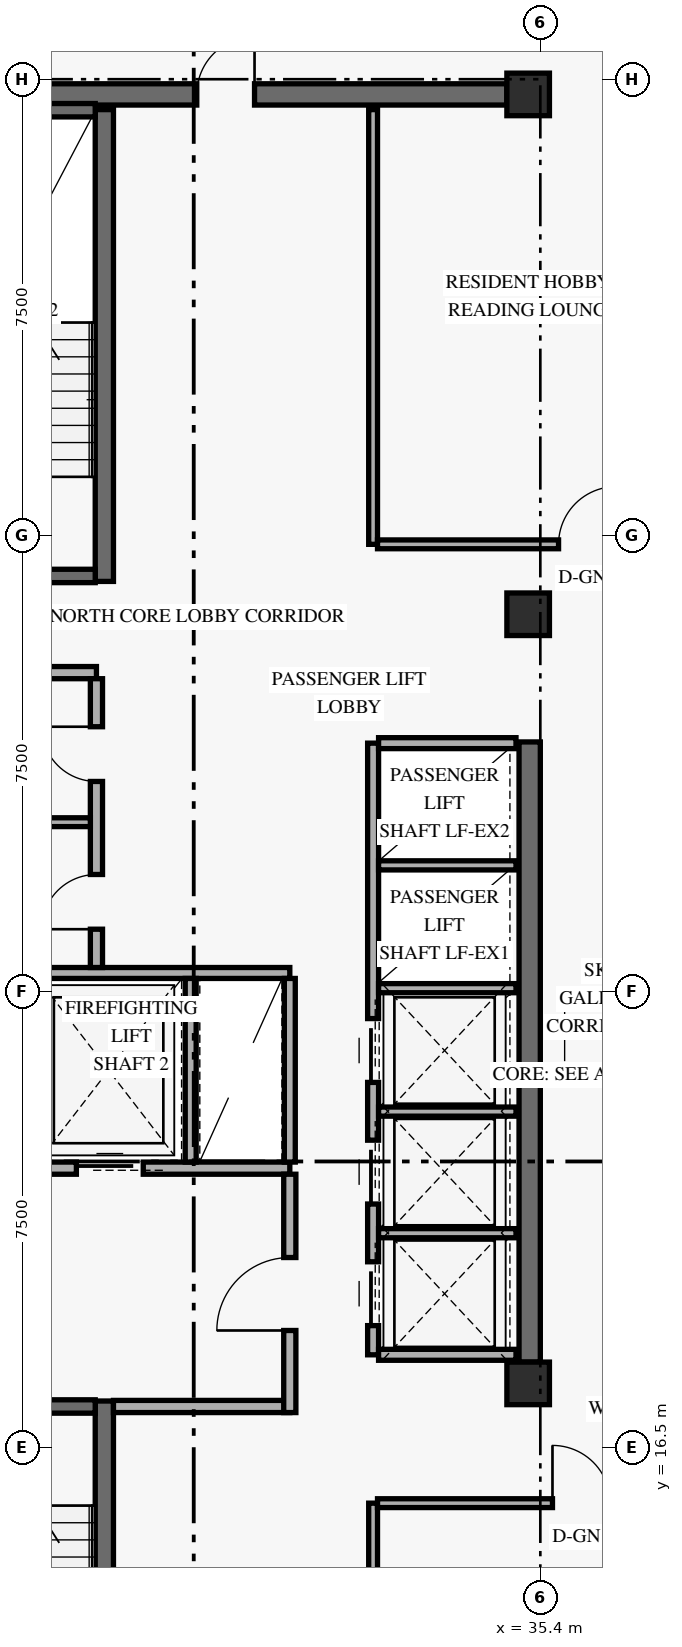
"""IFC4 building model, lengths in metres.
Left out: names, types, materials, properties, quantities, classifications, styles, units other than length and angle.
Written with IfcOpenShell. Run it as: python <this file> out.ifc"""

import sys

from ifc_helpers import new_model, si_unit, direction, frame, frame_2d, origin, origin_2d, place, context, subcontext, project, spatial, rectangle, extrude, element, fill, save


model = new_model("IFC4")
c1 = context("Model", 3, precision=1e-05, world=origin(), true_north=direction((0.0, 1.0)))
c2 = subcontext(c1, "Body", "Model", "MODEL_VIEW")
j1 = project(units=[si_unit("LENGTHUNIT", "METRE"), si_unit("PLANEANGLEUNIT", "RADIAN")], contexts=[c1])
p1 = place(None, origin())
s1 = spatial("IfcSite", under=j1, at=p1, CompositionType="ELEMENT")
p2 = place(p1, origin())
s2 = spatial("IfcBuilding", under=s1, at=p2, CompositionType="ELEMENT")
p3 = place(p2, frame((0.0, 0.0, 209.4)))
s3 = spatial("IfcBuildingStorey", under=s2, at=p3, CompositionType="ELEMENT", Elevation=209.4)
p4 = place(p3, frame((35.225, 17.9, 0.0), z_axis=(0.0, 0.0, 1.0), x_axis=(0.0, 1.0, 0.0)))
e1 = element("IfcWall", 1, at=p4, inside=s3, PredefinedType="SHEAR", context=c2, shape_type="SweptSolid", body=[
    extrude(rectangle(XDim=10.2, YDim=0.35, at=frame_2d((5.1, 0.0))), origin(), (0.0, 0.0, 1.0), 2.821),
])
p5 = place(p3, frame((24.55, 38.75, 0.0), z_axis=(0.0, 0.0, 1.0), x_axis=(1.0, 0.0, 0.0)))
e2 = element("IfcWall", 2, at=p5, inside=s3, PredefinedType="SHEAR", context=c2, shape_type="SweptSolid", body=[
    extrude(rectangle(XDim=10.3, YDim=0.35, at=frame_2d((5.15, 0.0))), origin(), (0.0, 0.0, 1.0), 3.36),
])
p6 = place(p5, frame((5.2, 0.0, 0.0)))
e3 = element("IfcOpeningElement", 3, at=p6, cuts=e2, PredefinedType="OPENING", context=c2, shape_type="SweptSolid", body=[
    extrude(rectangle(XDim=0.95, YDim=2.15, at=frame_2d((0.475, 1.075))), frame((0.0, 0.185, 0.0), z_axis=(0.0, -1.0, 0.0), x_axis=(1.0, 0.0, 0.0)), (0.0, 0.0, 1.0), 0.37),
])
p7 = place(p3, frame((28.23, 9.5, 0.0), z_axis=(0.0, 0.0, 1.0), x_axis=(0.0, 1.0, 0.0)))
e4 = element("IfcWall", 4, at=p7, inside=s3, PredefinedType="SHEAR", context=c2, shape_type="SweptSolid", body=[
    extrude(rectangle(XDim=7.76, YDim=0.3, at=frame_2d((3.88, 0.0))), origin(), (0.0, 0.0, 1.0), 3.36),
])
p8 = place(p3, frame((24.92, 17.17, 0.0), z_axis=(0.0, 0.0, 1.0), x_axis=(1.0, 0.0, 0.0)))
e5 = element("IfcWall", 5, at=p8, inside=s3, PredefinedType="SHEAR", context=c2, shape_type="SweptSolid", body=[
    extrude(rectangle(XDim=3.16, YDim=0.22, at=frame_2d((1.58, 0.0))), origin(), (0.0, 0.0, 1.0), 3.36),
])
p9 = place(p8, frame((0.78, 0.0, 0.0)))
e6 = element("IfcOpeningElement", 6, at=p9, cuts=e5, PredefinedType="OPENING", context=c2, shape_type="SweptSolid", body=[
    extrude(rectangle(XDim=1.05, YDim=2.15, at=frame_2d((0.525, 1.075))), frame((0.0, 0.12, 0.0), z_axis=(0.0, -1.0, 0.0), x_axis=(1.0, 0.0, 0.0)), (0.0, 0.0, 1.0), 0.24),
])
p10 = place(p3, frame((28.23, 30.74, 0.0), z_axis=(0.0, 0.0, 1.0), x_axis=(0.0, 1.0, 0.0)))
e7 = element("IfcWall", 7, at=p10, inside=s3, PredefinedType="SHEAR", context=c2, shape_type="SweptSolid", body=[
    extrude(rectangle(XDim=7.76, YDim=0.3, at=frame_2d((3.88, 0.0))), origin(), (0.0, 0.0, 1.0), 3.36),
])
p11 = place(p3, frame((24.92, 30.83, 0.0), z_axis=(0.0, 0.0, 1.0), x_axis=(1.0, 0.0, 0.0)))
e8 = element("IfcWall", 8, at=p11, inside=s3, PredefinedType="SHEAR", context=c2, shape_type="SweptSolid", body=[
    extrude(rectangle(XDim=3.16, YDim=0.22, at=frame_2d((1.58, 0.0))), origin(), (0.0, 0.0, 1.0), 3.36),
])
p12 = place(p11, frame((0.78, 0.0, 0.0)))
e9 = element("IfcOpeningElement", 9, at=p12, cuts=e8, PredefinedType="OPENING", context=c2, shape_type="SweptSolid", body=[
    extrude(rectangle(XDim=1.05, YDim=2.15, at=frame_2d((0.525, 1.075))), frame((0.0, 0.12, 0.0), z_axis=(0.0, -1.0, 0.0), x_axis=(1.0, 0.0, 0.0)), (0.0, 0.0, 1.0), 0.24),
])
p13 = place(p3, frame((24.92, 38.49, 0.0), z_axis=(0.0, 0.0, 1.0), x_axis=(1.0, 0.0, 0.0)))
e10 = element("IfcWall", 10, at=p13, inside=s3, PredefinedType="SHEAR", context=c2, shape_type="SweptSolid", body=[
    extrude(rectangle(XDim=3.16, YDim=0.22, at=frame_2d((1.58, 0.0))), origin(), (0.0, 0.0, 1.0), 3.36),
])
for number, where, z_axis, x_axis in (
    (11, (35.2, 17.55, 0.0), (0.0, 0.0, 1.0), (1.0, 0.0, 0.0)),
    (12, (35.2, 30.2, 0.0), (0.0, 0.0, 1.0), (1.0, 0.0, 0.0)),
    (13, (35.2, 38.75, 0.0), (0.0, 0.0, 1.0), (1.0, 0.0, 0.0)),
):
    element("IfcColumn", number, at=place(p3, frame(where, z_axis=z_axis, x_axis=x_axis)), inside=s3, PredefinedType="COLUMN", context=c2, shape_type="SweptSolid", body=[
        extrude(rectangle(XDim=0.7, YDim=0.7, at=origin_2d()), origin(), (0.0, 0.0, 1.0), 3.6),
    ])
p14 = place(p3, frame((24.45, 21.09, 0.0), z_axis=(0.0, 0.0, 1.0), x_axis=(1.0, 0.0, 0.0)))
e14 = element("IfcWall", 14, at=p14, inside=s3, PredefinedType="STANDARD", context=c2, shape_type="SweptSolid", body=[
    extrude(rectangle(XDim=6.83, YDim=0.2, at=frame_2d((3.415, 0.0))), origin(), (0.0, 0.0, 1.0), 3.36),
])
p15 = place(p14, frame((0.72, 0.0, 0.0)))
e15 = element("IfcOpeningElement", 15, at=p15, cuts=e14, PredefinedType="OPENING", context=c2, shape_type="SweptSolid", body=[
    extrude(rectangle(XDim=1.1, YDim=2.2, at=frame_2d((0.55, 1.1))), frame((0.0, 0.11, 0.0), z_axis=(0.0, -1.0, 0.0), x_axis=(1.0, 0.0, 0.0)), (0.0, 0.0, 1.0), 0.22),
])
p16 = place(p14, frame((3.32, 0.0, 0.0)))
e16 = element("IfcOpeningElement", 16, at=p16, cuts=e14, PredefinedType="OPENING", context=c2, shape_type="SweptSolid", body=[
    extrude(rectangle(XDim=1.1, YDim=2.2, at=frame_2d((0.55, 1.1))), frame((0.0, 0.11, 0.0), z_axis=(0.0, -1.0, 0.0), x_axis=(1.0, 0.0, 0.0)), (0.0, 0.0, 1.0), 0.22),
])
p17 = place(p3, frame((28.38, 17.17, 0.0), z_axis=(0.0, 0.0, 1.0), x_axis=(1.0, 0.0, 0.0)))
e17 = element("IfcWall", 17, at=p17, inside=s3, PredefinedType="STANDARD", context=c2, shape_type="SweptSolid", body=[
    extrude(rectangle(XDim=2.9, YDim=0.2, at=frame_2d((1.45, 0.0))), origin(), (0.0, 0.0, 1.0), 3.36),
])
p18 = place(p3, frame((31.28, 17.07, 0.0), z_axis=(0.0, 0.0, 1.0), x_axis=(0.0, 1.0, 0.0)))
e18 = element("IfcWall", 18, at=p18, inside=s3, PredefinedType="STANDARD", context=c2, shape_type="SweptSolid", body=[
    extrude(rectangle(XDim=3.92, YDim=0.2, at=frame_2d((1.96, 0.0))), origin(), (0.0, 0.0, 1.0), 2.803),
])
p19 = place(p18, frame((1.35, 0.0, 0.0)))
e19 = element("IfcOpeningElement", 19, at=p19, cuts=e18, PredefinedType="OPENING", context=c2, shape_type="SweptSolid", body=[
    extrude(rectangle(XDim=1.2, YDim=2.15, at=frame_2d((0.6, 1.075))), frame((0.0, 0.11, 0.0), z_axis=(0.0, -1.0, 0.0), x_axis=(1.0, 0.0, 0.0)), (0.0, 0.0, 1.0), 0.22),
])
p20 = place(p3, frame((24.45, 24.3, 0.0), z_axis=(0.0, 0.0, 1.0), x_axis=(1.0, 0.0, 0.0)))
e20 = element("IfcWall", 20, at=p20, inside=s3, PredefinedType="STANDARD", context=c2, shape_type="SweptSolid", body=[
    extrude(rectangle(XDim=6.83, YDim=0.18, at=frame_2d((3.415, 0.0))), origin(), (0.0, 0.0, 1.0), 3.36),
])
for number, where, z_axis, x_axis in (
    (21, (29.65, 21.19, 0.0), (0.0, 0.0, 1.0), (0.0, 1.0, 0.0)),
    (22, (31.28, 21.19, 0.0), (0.0, 0.0, 1.0), (0.0, 1.0, 0.0)),
):
    element("IfcWall", number, at=place(p3, frame(where, z_axis=z_axis, x_axis=x_axis)), inside=s3, PredefinedType="STANDARD", context=c2, shape_type="SweptSolid", body=[
        extrude(rectangle(XDim=3.02, YDim=0.18, at=frame_2d((1.51, 0.0))), origin(), (0.0, 0.0, 1.0), 3.36),
    ])
p21 = place(p3, frame((24.45, 29.24, 0.0), z_axis=(0.0, 0.0, 1.0), x_axis=(1.0, 0.0, 0.0)))
e23 = element("IfcWall", 23, at=p21, inside=s3, PredefinedType="STANDARD", context=c2, shape_type="SweptSolid", body=[
    extrude(rectangle(XDim=3.65, YDim=0.2, at=frame_2d((1.825, 0.0))), origin(), (0.0, 0.0, 1.0), 3.36),
])
p22 = place(p3, frame((28.1, 24.39, 0.0), z_axis=(0.0, 0.0, 1.0), x_axis=(0.0, 1.0, 0.0)))
e24 = element("IfcWall", 24, at=p22, inside=s3, PredefinedType="STANDARD", context=c2, shape_type="SweptSolid", body=[
    extrude(rectangle(XDim=4.75, YDim=0.2, at=frame_2d((2.375, 0.0))), origin(), (0.0, 0.0, 1.0), 3.36),
])
p23 = place(p22, frame((0.63, 0.0, 0.0)))
e25 = element("IfcOpeningElement", 25, at=p23, cuts=e24, PredefinedType="OPENING", context=c2, shape_type="SweptSolid", body=[
    extrude(rectangle(XDim=0.9, YDim=2.1, at=frame_2d((0.45, 1.05))), frame((0.0, 0.11, 0.0), z_axis=(0.0, -1.0, 0.0), x_axis=(1.0, 0.0, 0.0)), (0.0, 0.0, 1.0), 0.22),
])
p24 = place(p22, frame((3.06, 0.0, 0.0)))
e26 = element("IfcOpeningElement", 26, at=p24, cuts=e24, PredefinedType="OPENING", context=c2, shape_type="SweptSolid", body=[
    extrude(rectangle(XDim=0.9, YDim=2.1, at=frame_2d((0.45, 1.05))), frame((0.0, 0.11, 0.0), z_axis=(0.0, -1.0, 0.0), x_axis=(1.0, 0.0, 0.0)), (0.0, 0.0, 1.0), 0.22),
])
p25 = place(p3, frame((24.45, 26.78, 0.0), z_axis=(0.0, 0.0, 1.0), x_axis=(1.0, 0.0, 0.0)))
e27 = element("IfcWall", 27, at=p25, inside=s3, PredefinedType="PARTITIONING", context=c2, shape_type="SweptSolid", body=[
    extrude(rectangle(XDim=3.55, YDim=0.145, at=frame_2d((1.775, 0.0))), origin(), (0.0, 0.0, 1.0), 3.36),
])
p26 = place(p3, frame((32.65, 18.02, 0.0), z_axis=(0.0, 0.0, 1.0), x_axis=(0.0, 1.0, 0.0)))
e28 = element("IfcWall", 28, at=p26, inside=s3, PredefinedType="STANDARD", context=c2, shape_type="SweptSolid", body=[
    extrude(rectangle(XDim=10.06, YDim=0.18, at=frame_2d((5.03, 0.0))), origin(), (0.0, 0.0, 1.0), 3.36),
])
p27 = place(p26, frame((0.48, 0.0, 0.0)))
e29 = element("IfcOpeningElement", 29, at=p27, cuts=e28, PredefinedType="OPENING", context=c2, shape_type="SweptSolid", body=[
    extrude(rectangle(XDim=1.05, YDim=2.2, at=frame_2d((0.525, 1.1))), frame((0.0, 0.1, 0.0), z_axis=(0.0, -1.0, 0.0), x_axis=(1.0, 0.0, 0.0)), (0.0, 0.0, 1.0), 0.2),
])
p28 = place(p26, frame((2.48, 0.0, 0.0)))
e30 = element("IfcOpeningElement", 30, at=p28, cuts=e28, PredefinedType="OPENING", context=c2, shape_type="SweptSolid", body=[
    extrude(rectangle(XDim=1.05, YDim=2.2, at=frame_2d((0.525, 1.1))), frame((0.0, 0.1, 0.0), z_axis=(0.0, -1.0, 0.0), x_axis=(1.0, 0.0, 0.0)), (0.0, 0.0, 1.0), 0.2),
])
p29 = place(p26, frame((4.48, 0.0, 0.0)))
e31 = element("IfcOpeningElement", 31, at=p29, cuts=e28, PredefinedType="OPENING", context=c2, shape_type="SweptSolid", body=[
    extrude(rectangle(XDim=1.05, YDim=2.2, at=frame_2d((0.525, 1.1))), frame((0.0, 0.1, 0.0), z_axis=(0.0, -1.0, 0.0), x_axis=(1.0, 0.0, 0.0)), (0.0, 0.0, 1.0), 0.2),
])
for number, where, z_axis, x_axis in (
    (32, (32.74, 18.02, 0.0), (0.0, 0.0, 1.0), (1.0, 0.0, 0.0)),
    (33, (32.74, 28.08, 0.0), (0.0, 0.0, 1.0), (1.0, 0.0, 0.0)),
):
    element("IfcWall", number, at=place(p3, frame(where, z_axis=z_axis, x_axis=x_axis)), inside=s3, PredefinedType="STANDARD", context=c2, shape_type="SweptSolid", body=[
        extrude(rectangle(XDim=2.26, YDim=0.18, at=frame_2d((1.13, 0.0))), origin(), (0.0, 0.0, 1.0), 3.36),
    ])
for number, where, z_axis, x_axis in (
    (34, (32.74, 20.02, 0.0), (0.0, 0.0, 1.0), (1.0, 0.0, 0.0)),
    (35, (32.74, 22.02, 0.0), (0.0, 0.0, 1.0), (1.0, 0.0, 0.0)),
    (36, (32.74, 24.05, 0.0), (0.0, 0.0, 1.0), (1.0, 0.0, 0.0)),
    (37, (32.74, 26.07, 0.0), (0.0, 0.0, 1.0), (1.0, 0.0, 0.0)),
):
    element("IfcWall", number, at=place(p3, frame(where, z_axis=z_axis, x_axis=x_axis)), inside=s3, PredefinedType="STANDARD", context=c2, shape_type="SweptSolid", body=[
        extrude(rectangle(XDim=2.26, YDim=0.15, at=frame_2d((1.13, 0.0))), origin(), (0.0, 0.0, 1.0), 3.36),
    ])
p30 = place(p3, frame((32.65, 9.5, 0.0), z_axis=(0.0, 0.0, 1.0), x_axis=(0.0, 1.0, 0.0)))
e38 = element("IfcWall", 38, at=p30, inside=s3, PredefinedType="PARTITIONING", context=c2, shape_type="SweptSolid", body=[
    extrude(rectangle(XDim=6.08, YDim=0.145, at=frame_2d((3.04, 0.0))), origin(), (0.0, 0.0, 1.0), 3.36),
])
p31 = place(p3, frame((32.722, 15.58, 0.0), z_axis=(0.0, 0.0, 1.0), x_axis=(1.0, 0.0, 0.0)))
e39 = element("IfcWall", 39, at=p31, inside=s3, PredefinedType="PARTITIONING", context=c2, shape_type="SweptSolid", body=[
    extrude(rectangle(XDim=5.228, YDim=0.145, at=frame_2d((2.614, 0.0))), origin(), (0.0, 0.0, 1.0), 2.803),
])
p32 = place(p31, frame((2.877, 0.0, 0.0)))
e40 = element("IfcOpeningElement", 40, at=p32, cuts=e39, PredefinedType="OPENING", context=c2, shape_type="SweptSolid", body=[
    extrude(rectangle(XDim=0.95, YDim=2.15, at=frame_2d((0.475, 1.075))), frame((0.0, 0.083, 0.0), z_axis=(0.0, -1.0, 0.0), x_axis=(1.0, 0.0, 0.0)), (0.0, 0.0, 1.0), 0.165),
])
p33 = place(p3, frame((32.65, 31.35, 0.0), z_axis=(0.0, 0.0, 1.0), x_axis=(0.0, 1.0, 0.0)))
e41 = element("IfcWall", 41, at=p33, inside=s3, PredefinedType="PARTITIONING", context=c2, shape_type="SweptSolid", body=[
    extrude(rectangle(XDim=7.15, YDim=0.145, at=frame_2d((3.575, 0.0))), origin(), (0.0, 0.0, 1.0), 3.36),
])
p34 = place(p3, frame((32.722, 31.35, 0.0), z_axis=(0.0, 0.0, 1.0), x_axis=(1.0, 0.0, 0.0)))
e42 = element("IfcWall", 42, at=p34, inside=s3, PredefinedType="PARTITIONING", context=c2, shape_type="SweptSolid", body=[
    extrude(rectangle(XDim=5.778, YDim=0.145, at=frame_2d((2.889, 0.0))), origin(), (0.0, 0.0, 1.0), 2.803),
])
p35 = place(p34, frame((2.978, 0.0, 0.0)))
e43 = element("IfcOpeningElement", 43, at=p35, cuts=e42, PredefinedType="OPENING", context=c2, shape_type="SweptSolid", body=[
    extrude(rectangle(XDim=0.95, YDim=2.15, at=frame_2d((0.475, 1.075))), frame((0.0, 0.083, 0.0), z_axis=(0.0, -1.0, 0.0), x_axis=(1.0, 0.0, 0.0)), (0.0, 0.0, 1.0), 0.165),
])
p36 = place(p16, origin())
e44 = element("IfcDoor", 44, at=p36, inside=s3, OperationType="SLIDING_TO_LEFT", PredefinedType="DOOR", context=c2, shape_type="SweptSolid", body=[
    extrude(rectangle(XDim=1.1, YDim=2.2, at=frame_2d((0.55, 1.1))), frame((0.0, 0.025, 0.0), z_axis=(0.0, -1.0, 0.0), x_axis=(1.0, 0.0, 0.0)), (0.0, 0.0, 1.0), 0.05),
])
fill(e16, e44)
p37 = place(p19, origin())
e45 = element("IfcDoor", 45, at=p37, inside=s3, OperationType="SINGLE_SWING_LEFT", PredefinedType="DOOR", context=c2, shape_type="SweptSolid", body=[
    extrude(rectangle(XDim=1.2, YDim=2.15, at=frame_2d((0.6, 1.075))), frame((0.0, 0.025, 0.0), z_axis=(0.0, -1.0, 0.0), x_axis=(1.0, 0.0, 0.0)), (0.0, 0.0, 1.0), 0.05),
])
fill(e19, e45)
p38 = place(p23, origin())
e46 = element("IfcDoor", 46, at=p38, inside=s3, OperationType="SINGLE_SWING_LEFT", PredefinedType="DOOR", context=c2, shape_type="SweptSolid", body=[
    extrude(rectangle(XDim=0.9, YDim=2.1, at=frame_2d((0.45, 1.05))), frame((0.0, 0.025, 0.0), z_axis=(0.0, -1.0, 0.0), x_axis=(1.0, 0.0, 0.0)), (0.0, 0.0, 1.0), 0.05),
])
fill(e25, e46)
p39 = place(p24, origin())
e47 = element("IfcDoor", 47, at=p39, inside=s3, OperationType="SINGLE_SWING_RIGHT", PredefinedType="DOOR", context=c2, shape_type="SweptSolid", body=[
    extrude(rectangle(XDim=0.9, YDim=2.1, at=frame_2d((0.45, 1.05))), frame((0.0, 0.025, 0.0), z_axis=(0.0, -1.0, 0.0), x_axis=(1.0, 0.0, 0.0)), (0.0, 0.0, 1.0), 0.05),
])
fill(e26, e47)
p40 = place(p27, origin())
e48 = element("IfcDoor", 48, at=p40, inside=s3, OperationType="SLIDING_TO_LEFT", PredefinedType="DOOR", context=c2, shape_type="SweptSolid", body=[
    extrude(rectangle(XDim=1.05, YDim=2.2, at=frame_2d((0.525, 1.1))), frame((0.0, 0.025, 0.0), z_axis=(0.0, -1.0, 0.0), x_axis=(1.0, 0.0, 0.0)), (0.0, 0.0, 1.0), 0.05),
])
fill(e29, e48)
p41 = place(p28, origin())
e49 = element("IfcDoor", 49, at=p41, inside=s3, OperationType="SLIDING_TO_LEFT", PredefinedType="DOOR", context=c2, shape_type="SweptSolid", body=[
    extrude(rectangle(XDim=1.05, YDim=2.2, at=frame_2d((0.525, 1.1))), frame((0.0, 0.025, 0.0), z_axis=(0.0, -1.0, 0.0), x_axis=(1.0, 0.0, 0.0)), (0.0, 0.0, 1.0), 0.05),
])
fill(e30, e49)
p42 = place(p29, origin())
e50 = element("IfcDoor", 50, at=p42, inside=s3, OperationType="SLIDING_TO_LEFT", PredefinedType="DOOR", context=c2, shape_type="SweptSolid", body=[
    extrude(rectangle(XDim=1.05, YDim=2.2, at=frame_2d((0.525, 1.1))), frame((0.0, 0.025, 0.0), z_axis=(0.0, -1.0, 0.0), x_axis=(1.0, 0.0, 0.0)), (0.0, 0.0, 1.0), 0.05),
])
fill(e31, e50)
p43 = place(p32, origin())
e51 = element("IfcDoor", 51, at=p43, inside=s3, OperationType="SINGLE_SWING_LEFT", PredefinedType="DOOR", context=c2, shape_type="SweptSolid", body=[
    extrude(rectangle(XDim=0.95, YDim=2.15, at=frame_2d((0.475, 1.075))), frame((0.0, 0.025, 0.0), z_axis=(0.0, -1.0, 0.0), x_axis=(1.0, 0.0, 0.0)), (0.0, 0.0, 1.0), 0.05),
])
fill(e40, e51)
p44 = place(p35, origin())
e52 = element("IfcDoor", 52, at=p44, inside=s3, OperationType="SINGLE_SWING_RIGHT", PredefinedType="DOOR", context=c2, shape_type="SweptSolid", body=[
    extrude(rectangle(XDim=0.95, YDim=2.15, at=frame_2d((0.475, 1.075))), frame((0.0, 0.025, 0.0), z_axis=(0.0, -1.0, 0.0), x_axis=(1.0, 0.0, 0.0)), (0.0, 0.0, 1.0), 0.05),
])
fill(e43, e52)
p45 = place(p6, origin())
e53 = element("IfcDoor", 53, at=p45, inside=s3, OperationType="SINGLE_SWING_RIGHT", PredefinedType="DOOR", context=c2, shape_type="SweptSolid", body=[
    extrude(rectangle(XDim=0.95, YDim=2.15, at=frame_2d((0.475, 1.075))), frame((0.0, 0.025, 0.0), z_axis=(0.0, -1.0, 0.0), x_axis=(1.0, 0.0, 0.0)), (0.0, 0.0, 1.0), 0.05),
])
fill(e3, e53)
save(model, sys.argv[1])
